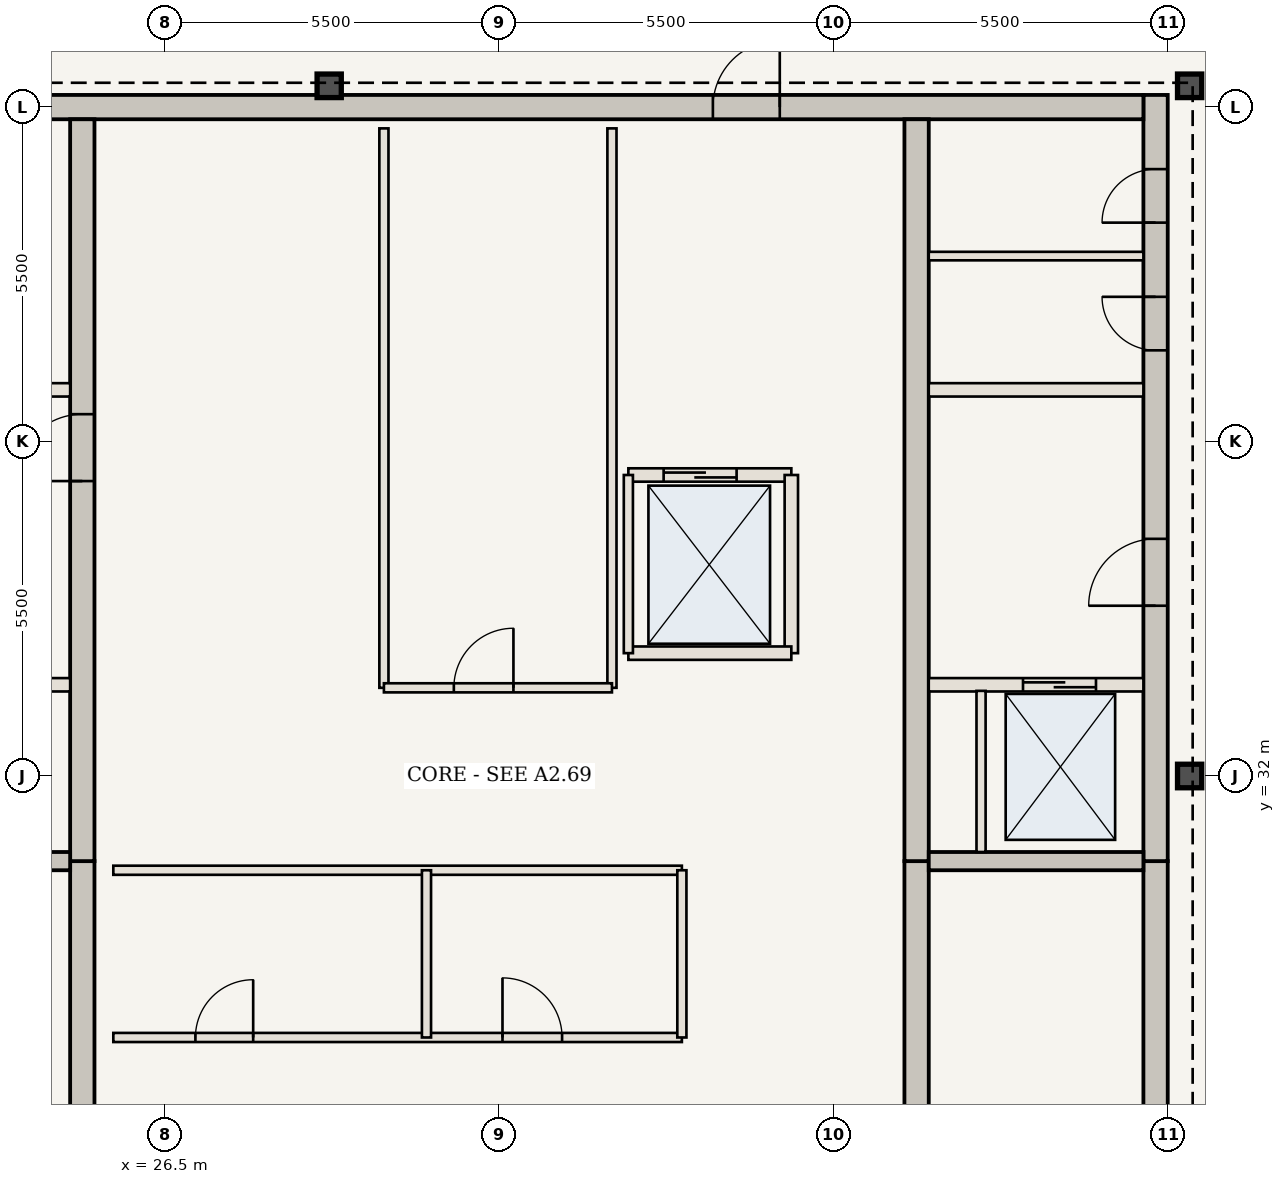
"""IFC4 building model, lengths in metres.
Left out: names, types, materials, properties, quantities, classifications, styles, units other than length and angle.
Written with IfcOpenShell. Run it as: python <this file> out.ifc"""

import sys

from ifc_helpers import new_model, si_unit, direction, frame, frame_2d, origin, origin_2d, place, context, subcontext, project, spatial, rectangle, i_section, extrude, element, fill, save


model = new_model("IFC4")
c1 = context("Model", 3, precision=1e-05, world=origin(), true_north=direction((0.0, 1.0)))
c2 = subcontext(c1, "Body", "Model", "MODEL_VIEW")
j1 = project(units=[si_unit("LENGTHUNIT", "METRE"), si_unit("PLANEANGLEUNIT", "RADIAN")], contexts=[c1])
p1 = place(None, origin())
s1 = spatial("IfcSite", under=j1, at=p1, CompositionType="ELEMENT")
p2 = place(p1, origin())
s2 = spatial("IfcBuilding", under=s1, at=p2, CompositionType="ELEMENT")
p3 = place(p2, frame((0.0, 0.0, 331.45)))
s3 = spatial("IfcBuildingStorey", under=s2, at=p3, CompositionType="ELEMENT", Elevation=331.45)
p4 = place(p3, frame((42.79, 20.75, 0.0), z_axis=(0.0, 0.0, 1.0), x_axis=(0.0, 1.0, 0.0)))
e1 = element("IfcWall", 1, at=p4, inside=s3, PredefinedType="SHEAR", context=c2, shape_type="SweptSolid", body=[
    extrude(rectangle(XDim=9.85, YDim=0.4, at=frame_2d((4.925, 0.0))), origin(), (0.0, 0.0, 1.0), 5.6),
])
p5 = place(p4, frame((1.0, 0.0, 0.0)))
e2 = element("IfcOpeningElement", 2, at=p5, cuts=e1, PredefinedType="OPENING", context=c2, shape_type="SweptSolid", body=[
    extrude(rectangle(XDim=1.15, YDim=2.15, at=frame_2d((0.575, 1.075))), frame((0.0, 0.21, 0.0), z_axis=(0.0, -1.0, 0.0), x_axis=(1.0, 0.0, 0.0)), (0.0, 0.0, 1.0), 0.42),
])
p6 = place(p3, frame((42.79, 30.6, 0.0), z_axis=(0.0, 0.0, 1.0), x_axis=(0.0, 1.0, 0.0)))
e3 = element("IfcWall", 3, at=p6, inside=s3, PredefinedType="SHEAR", context=c2, shape_type="SweptSolid", body=[
    extrude(rectangle(XDim=12.6, YDim=0.4, at=frame_2d((6.3, 0.0))), origin(), (0.0, 0.0, 1.0), 5.6),
])
p7 = place(p6, frame((4.2, 0.0, 0.0)))
e4 = element("IfcOpeningElement", 4, at=p7, cuts=e3, PredefinedType="OPENING", context=c2, shape_type="SweptSolid", body=[
    extrude(rectangle(XDim=1.1, YDim=2.15, at=frame_2d((0.55, 1.075))), frame((0.0, 0.21, 0.0), z_axis=(0.0, -1.0, 0.0), x_axis=(1.0, 0.0, 0.0)), (0.0, 0.0, 1.0), 0.42),
])
p8 = place(p6, frame((8.4, 0.0, 0.0)))
e5 = element("IfcOpeningElement", 5, at=p8, cuts=e3, PredefinedType="OPENING", context=c2, shape_type="SweptSolid", body=[
    extrude(rectangle(XDim=0.88, YDim=2.1, at=frame_2d((0.44, 1.05))), frame((0.0, 0.21, 0.0), z_axis=(0.0, -1.0, 0.0), x_axis=(1.0, 0.0, 0.0)), (0.0, 0.0, 1.0), 0.42),
])
p9 = place(p6, frame((10.5, 0.0, 0.0)))
e6 = element("IfcOpeningElement", 6, at=p9, cuts=e3, PredefinedType="OPENING", context=c2, shape_type="SweptSolid", body=[
    extrude(rectangle(XDim=0.88, YDim=2.1, at=frame_2d((0.44, 1.05))), frame((0.0, 0.21, 0.0), z_axis=(0.0, -1.0, 0.0), x_axis=(1.0, 0.0, 0.0)), (0.0, 0.0, 1.0), 0.42),
])
p10 = place(p3, frame((21.41, 43.0, 0.0), z_axis=(0.0, 0.0, 1.0), x_axis=(1.0, 0.0, 0.0)))
e7 = element("IfcWall", 7, at=p10, inside=s3, PredefinedType="SHEAR", context=c2, shape_type="SweptSolid", body=[
    extrude(rectangle(XDim=21.18, YDim=0.4, at=frame_2d((10.59, 0.0))), origin(), (0.0, 0.0, 1.0), 5.6),
])
p11 = place(p10, frame((14.1, 0.0, 0.0)))
e8 = element("IfcOpeningElement", 8, at=p11, cuts=e7, PredefinedType="OPENING", context=c2, shape_type="SweptSolid", body=[
    extrude(rectangle(XDim=1.1, YDim=2.15, at=frame_2d((0.55, 1.075))), frame((0.0, 0.21, 0.0), z_axis=(0.0, -1.0, 0.0), x_axis=(1.0, 0.0, 0.0)), (0.0, 0.0, 1.0), 0.42),
])
p12 = place(p3, frame((25.14, 21.15, 0.0), z_axis=(0.0, 0.0, 1.0), x_axis=(0.0, 1.0, 0.0)))
e9 = element("IfcWall", 9, at=p12, inside=s3, PredefinedType="SHEAR", context=c2, shape_type="SweptSolid", body=[
    extrude(rectangle(XDim=9.45, YDim=0.4, at=frame_2d((4.725, 0.0))), origin(), (0.0, 0.0, 1.0), 5.6),
])
p13 = place(p3, frame((25.14, 30.6, 0.0), z_axis=(0.0, 0.0, 1.0), x_axis=(0.0, 1.0, 0.0)))
e10 = element("IfcWall", 10, at=p13, inside=s3, PredefinedType="SHEAR", context=c2, shape_type="SweptSolid", body=[
    extrude(rectangle(XDim=12.2, YDim=0.4, at=frame_2d((6.1, 0.0))), origin(), (0.0, 0.0, 1.0), 5.6),
])
p14 = place(p13, frame((6.25, 0.0, 0.0)))
e11 = element("IfcOpeningElement", 11, at=p14, cuts=e10, PredefinedType="OPENING", context=c2, shape_type="SweptSolid", body=[
    extrude(rectangle(XDim=1.1, YDim=2.15, at=frame_2d((0.55, 1.075))), frame((0.0, 0.21, 0.0), z_axis=(0.0, -1.0, 0.0), x_axis=(1.0, 0.0, 0.0)), (0.0, 0.0, 1.0), 0.42),
])
p15 = place(p3, frame((38.86, 21.15, 0.0), z_axis=(0.0, 0.0, 1.0), x_axis=(0.0, 1.0, 0.0)))
e12 = element("IfcWall", 12, at=p15, inside=s3, PredefinedType="SHEAR", context=c2, shape_type="SweptSolid", body=[
    extrude(rectangle(XDim=9.45, YDim=0.4, at=frame_2d((4.725, 0.0))), origin(), (0.0, 0.0, 1.0), 5.6),
])
p16 = place(p3, frame((38.86, 30.6, 0.0), z_axis=(0.0, 0.0, 1.0), x_axis=(0.0, 1.0, 0.0)))
e13 = element("IfcWall", 13, at=p16, inside=s3, PredefinedType="SHEAR", context=c2, shape_type="SweptSolid", body=[
    extrude(rectangle(XDim=12.2, YDim=0.4, at=frame_2d((6.1, 0.0))), origin(), (0.0, 0.0, 1.0), 5.6),
])
p17 = place(p3, frame((43.35, 32.0, 0.0), z_axis=(0.0, 0.0, 1.0), x_axis=(1.0, 0.0, 0.0)))
e14 = element("IfcColumn", 14, at=p17, inside=s3, PredefinedType="COLUMN", context=c2, shape_type="SweptSolid", body=[
    extrude(i_section(OverallWidth=0.398, OverallDepth=0.387, WebThickness=0.021, FlangeThickness=0.033, at=origin_2d()), origin(), (0.0, 0.0, 1.0), 13.29),
])
for number, where, z_axis, x_axis in (
    (15, (43.35, 43.35, 0.0), (0.0, 0.0, 1.0), (1.0, 0.0, 0.0)),
    (16, (29.2, 43.35, 0.0), (0.0, 0.0, 1.0), (1.0, 0.0, 0.0)),
):
    element("IfcColumn", number, at=place(p3, frame(where, z_axis=z_axis, x_axis=x_axis)), inside=s3, PredefinedType="COLUMN", context=c2, shape_type="SweptSolid", body=[
        extrude(i_section(OverallWidth=0.398, OverallDepth=0.387, WebThickness=0.021, FlangeThickness=0.033, at=origin_2d()), origin(), (0.0, 0.0, 1.0), 18.839),
    ])
for number, where, z_axis, x_axis in (
    (17, (21.41, 30.6, 0.0), (0.0, 0.0, 1.0), (1.0, 0.0, 0.0)),
    (18, (39.06, 30.6, 0.0), (0.0, 0.0, 1.0), (1.0, 0.0, 0.0)),
):
    element("IfcWall", number, at=place(p3, frame(where, z_axis=z_axis, x_axis=x_axis)), inside=s3, PredefinedType="SHEAR", context=c2, shape_type="SweptSolid", body=[
        extrude(rectangle(XDim=3.53, YDim=0.3, at=frame_2d((1.765, 0.0))), origin(), (0.0, 0.0, 1.0), 5.35),
    ])
p18 = place(p3, frame((21.41, 33.5, 0.0), z_axis=(0.0, 0.0, 1.0), x_axis=(1.0, 0.0, 0.0)))
e19 = element("IfcWall", 19, at=p18, inside=s3, PredefinedType="STANDARD", context=c2, shape_type="SweptSolid", body=[
    extrude(rectangle(XDim=3.53, YDim=0.22, at=frame_2d((1.765, 0.0))), origin(), (0.0, 0.0, 1.0), 5.35),
])
p19 = place(p18, frame((0.75, 0.0, 0.0)))
e20 = element("IfcOpeningElement", 20, at=p19, cuts=e19, PredefinedType="OPENING", context=c2, shape_type="SweptSolid", body=[
    extrude(rectangle(XDim=1.2, YDim=2.2, at=frame_2d((0.6, 1.1))), frame((0.0, 0.12, 0.0), z_axis=(0.0, -1.0, 0.0), x_axis=(1.0, 0.0, 0.0)), (0.0, 0.0, 1.0), 0.24),
])
p20 = place(p3, frame((39.06, 33.5, 0.0), z_axis=(0.0, 0.0, 1.0), x_axis=(1.0, 0.0, 0.0)))
e21 = element("IfcWall", 21, at=p20, inside=s3, PredefinedType="STANDARD", context=c2, shape_type="SweptSolid", body=[
    extrude(rectangle(XDim=3.53, YDim=0.22, at=frame_2d((1.765, 0.0))), origin(), (0.0, 0.0, 1.0), 5.35),
])
p21 = place(p20, frame((1.55, 0.0, 0.0)))
e22 = element("IfcOpeningElement", 22, at=p21, cuts=e21, PredefinedType="OPENING", context=c2, shape_type="SweptSolid", body=[
    extrude(rectangle(XDim=1.2, YDim=2.2, at=frame_2d((0.6, 1.1))), frame((0.0, 0.12, 0.0), z_axis=(0.0, -1.0, 0.0), x_axis=(1.0, 0.0, 0.0)), (0.0, 0.0, 1.0), 0.24),
])
p22 = place(p3, frame((39.92, 30.75, 0.0), z_axis=(0.0, 0.0, 1.0), x_axis=(0.0, 1.0, 0.0)))
e23 = element("IfcWall", 23, at=p22, inside=s3, PredefinedType="STANDARD", context=c2, shape_type="SweptSolid", body=[
    extrude(rectangle(XDim=2.65, YDim=0.15, at=frame_2d((1.325, 0.0))), origin(), (0.0, 0.0, 1.0), 5.35),
])
for number, where, z_axis, x_axis in (
    (24, (21.41, 38.35, 0.0), (0.0, 0.0, 1.0), (1.0, 0.0, 0.0)),
    (25, (39.06, 38.35, 0.0), (0.0, 0.0, 1.0), (1.0, 0.0, 0.0)),
):
    element("IfcWall", number, at=place(p3, frame(where, z_axis=z_axis, x_axis=x_axis)), inside=s3, PredefinedType="STANDARD", context=c2, shape_type="SweptSolid", body=[
        extrude(rectangle(XDim=3.53, YDim=0.22, at=frame_2d((1.765, 0.0))), origin(), (0.0, 0.0, 1.0), 5.35),
    ])
p23 = place(p3, frame((39.06, 40.55, 0.0), z_axis=(0.0, 0.0, 1.0), x_axis=(1.0, 0.0, 0.0)))
e26 = element("IfcWall", 26, at=p23, inside=s3, PredefinedType="STANDARD", context=c2, shape_type="SweptSolid", body=[
    extrude(rectangle(XDim=3.53, YDim=0.14, at=frame_2d((1.765, 0.0))), origin(), (0.0, 0.0, 1.0), 5.35),
])
p24 = place(p3, frame((25.65, 27.7, 0.0), z_axis=(0.0, 0.0, 1.0), x_axis=(1.0, 0.0, 0.0)))
e27 = element("IfcWall", 27, at=p24, inside=s3, PredefinedType="STANDARD", context=c2, shape_type="SweptSolid", body=[
    extrude(rectangle(XDim=9.35, YDim=0.15, at=frame_2d((4.675, 0.0))), origin(), (0.0, 0.0, 1.0), 5.35),
])
p25 = place(p24, frame((1.35, 0.0, 0.0)))
e28 = element("IfcOpeningElement", 28, at=p25, cuts=e27, PredefinedType="OPENING", context=c2, shape_type="SweptSolid", body=[
    extrude(rectangle(XDim=0.95, YDim=2.15, at=frame_2d((0.475, 1.075))), frame((0.0, 0.085, 0.0), z_axis=(0.0, -1.0, 0.0), x_axis=(1.0, 0.0, 0.0)), (0.0, 0.0, 1.0), 0.17),
])
p26 = place(p24, frame((6.4, 0.0, 0.0)))
e29 = element("IfcOpeningElement", 29, at=p26, cuts=e27, PredefinedType="OPENING", context=c2, shape_type="SweptSolid", body=[
    extrude(rectangle(XDim=0.98, YDim=2.2, at=frame_2d((0.49, 1.1))), frame((0.0, 0.085, 0.0), z_axis=(0.0, -1.0, 0.0), x_axis=(1.0, 0.0, 0.0)), (0.0, 0.0, 1.0), 0.17),
])
p27 = place(p3, frame((25.65, 30.45, 0.0), z_axis=(0.0, 0.0, 1.0), x_axis=(1.0, 0.0, 0.0)))
e30 = element("IfcWall", 30, at=p27, inside=s3, PredefinedType="STANDARD", context=c2, shape_type="SweptSolid", body=[
    extrude(rectangle(XDim=9.35, YDim=0.15, at=frame_2d((4.675, 0.0))), origin(), (0.0, 0.0, 1.0), 5.35),
])
for number, where, z_axis, x_axis in (
    (31, (30.8, 27.7, 0.0), (0.0, 0.0, 1.0), (0.0, 1.0, 0.0)),
    (32, (35.0, 27.7, 0.0), (0.0, 0.0, 1.0), (0.0, 1.0, 0.0)),
):
    element("IfcWall", number, at=place(p3, frame(where, z_axis=z_axis, x_axis=x_axis)), inside=s3, PredefinedType="STANDARD", context=c2, shape_type="SweptSolid", body=[
        extrude(rectangle(XDim=2.75, YDim=0.15, at=frame_2d((1.375, 0.0))), origin(), (0.0, 0.0, 1.0), 5.35),
    ])
for number, where, z_axis, x_axis in (
    (33, (30.1, 33.45, 0.0), (0.0, 0.0, 1.0), (0.0, 1.0, 0.0)),
    (34, (33.85, 33.45, 0.0), (0.0, 0.0, 1.0), (0.0, 1.0, 0.0)),
):
    element("IfcWall", number, at=place(p3, frame(where, z_axis=z_axis, x_axis=x_axis)), inside=s3, PredefinedType="STANDARD", context=c2, shape_type="SweptSolid", body=[
        extrude(rectangle(XDim=9.2, YDim=0.15, at=frame_2d((4.6, 0.0))), origin(), (0.0, 0.0, 1.0), 5.35),
    ])
p28 = place(p3, frame((30.1, 33.45, 0.0), z_axis=(0.0, 0.0, 1.0), x_axis=(1.0, 0.0, 0.0)))
e35 = element("IfcWall", 35, at=p28, inside=s3, PredefinedType="STANDARD", context=c2, shape_type="SweptSolid", body=[
    extrude(rectangle(XDim=3.75, YDim=0.15, at=frame_2d((1.875, 0.0))), origin(), (0.0, 0.0, 1.0), 5.35),
])
p29 = place(p28, frame((1.15, 0.0, 0.0)))
e36 = element("IfcOpeningElement", 36, at=p29, cuts=e35, PredefinedType="OPENING", context=c2, shape_type="SweptSolid", body=[
    extrude(rectangle(XDim=0.98, YDim=2.2, at=frame_2d((0.49, 1.1))), frame((0.0, 0.085, 0.0), z_axis=(0.0, -1.0, 0.0), x_axis=(1.0, 0.0, 0.0)), (0.0, 0.0, 1.0), 0.17),
])
p30 = place(p3, frame((34.12, 36.95, 0.0), z_axis=(0.0, 0.0, 1.0), x_axis=(1.0, 0.0, 0.0)))
e37 = element("IfcWall", 37, at=p30, inside=s3, PredefinedType="STANDARD", context=c2, shape_type="SweptSolid", body=[
    extrude(rectangle(XDim=2.68, YDim=0.22, at=frame_2d((1.34, 0.0))), origin(), (0.0, 0.0, 1.0), 5.35),
])
p31 = place(p30, frame((0.58, 0.0, 0.0)))
e38 = element("IfcOpeningElement", 38, at=p31, cuts=e37, PredefinedType="OPENING", context=c2, shape_type="SweptSolid", body=[
    extrude(rectangle(XDim=1.2, YDim=2.2, at=frame_2d((0.6, 1.1))), frame((0.0, 0.12, 0.0), z_axis=(0.0, -1.0, 0.0), x_axis=(1.0, 0.0, 0.0)), (0.0, 0.0, 1.0), 0.24),
])
p32 = place(p3, frame((36.8, 34.02, 0.0), z_axis=(0.0, 0.0, 1.0), x_axis=(0.0, 1.0, 0.0)))
e39 = element("IfcWall", 39, at=p32, inside=s3, PredefinedType="STANDARD", context=c2, shape_type="SweptSolid", body=[
    extrude(rectangle(XDim=2.93, YDim=0.22, at=frame_2d((1.465, 0.0))), origin(), (0.0, 0.0, 1.0), 5.35),
])
p33 = place(p3, frame((34.12, 34.02, 0.0), z_axis=(0.0, 0.0, 1.0), x_axis=(1.0, 0.0, 0.0)))
e40 = element("IfcWall", 40, at=p33, inside=s3, PredefinedType="STANDARD", context=c2, shape_type="SweptSolid", body=[
    extrude(rectangle(XDim=2.68, YDim=0.22, at=frame_2d((1.34, 0.0))), origin(), (0.0, 0.0, 1.0), 5.35),
])
p34 = place(p3, frame((34.12, 34.02, 0.0), z_axis=(0.0, 0.0, 1.0), x_axis=(0.0, 1.0, 0.0)))
e41 = element("IfcWall", 41, at=p34, inside=s3, PredefinedType="STANDARD", context=c2, shape_type="SweptSolid", body=[
    extrude(rectangle(XDim=2.93, YDim=0.15, at=frame_2d((1.465, 0.0))), origin(), (0.0, 0.0, 1.0), 5.35),
])
p35 = place(p7, origin())
e42 = element("IfcDoor", 42, at=p35, inside=s3, OperationType="SINGLE_SWING_LEFT", PredefinedType="DOOR", context=c2, shape_type="SweptSolid", body=[
    extrude(rectangle(XDim=1.1, YDim=2.15, at=frame_2d((0.55, 1.075))), frame((0.0, 0.025, 0.0), z_axis=(0.0, -1.0, 0.0), x_axis=(1.0, 0.0, 0.0)), (0.0, 0.0, 1.0), 0.05),
])
fill(e4, e42)
p36 = place(p14, origin())
e43 = element("IfcDoor", 43, at=p36, inside=s3, OperationType="SINGLE_SWING_LEFT", PredefinedType="DOOR", context=c2, shape_type="SweptSolid", body=[
    extrude(rectangle(XDim=1.1, YDim=2.15, at=frame_2d((0.55, 1.075))), frame((0.0, 0.025, 0.0), z_axis=(0.0, -1.0, 0.0), x_axis=(1.0, 0.0, 0.0)), (0.0, 0.0, 1.0), 0.05),
])
fill(e11, e43)
p37 = place(p8, origin())
e44 = element("IfcDoor", 44, at=p37, inside=s3, OperationType="SINGLE_SWING_RIGHT", PredefinedType="DOOR", context=c2, shape_type="SweptSolid", body=[
    extrude(rectangle(XDim=0.88, YDim=2.1, at=frame_2d((0.44, 1.05))), frame((0.0, 0.025, 0.0), z_axis=(0.0, -1.0, 0.0), x_axis=(1.0, 0.0, 0.0)), (0.0, 0.0, 1.0), 0.05),
])
fill(e5, e44)
p38 = place(p9, origin())
e45 = element("IfcDoor", 45, at=p38, inside=s3, OperationType="SINGLE_SWING_LEFT", PredefinedType="DOOR", context=c2, shape_type="SweptSolid", body=[
    extrude(rectangle(XDim=0.88, YDim=2.1, at=frame_2d((0.44, 1.05))), frame((0.0, 0.025, 0.0), z_axis=(0.0, -1.0, 0.0), x_axis=(1.0, 0.0, 0.0)), (0.0, 0.0, 1.0), 0.05),
])
fill(e6, e45)
p39 = place(p11, origin())
e46 = element("IfcDoor", 46, at=p39, inside=s3, OperationType="SINGLE_SWING_RIGHT", PredefinedType="DOOR", context=c2, shape_type="SweptSolid", body=[
    extrude(rectangle(XDim=1.1, YDim=2.15, at=frame_2d((0.55, 1.075))), frame((0.0, 0.025, 0.0), z_axis=(0.0, -1.0, 0.0), x_axis=(1.0, 0.0, 0.0)), (0.0, 0.0, 1.0), 0.05),
])
fill(e8, e46)
p40 = place(p21, origin())
e47 = element("IfcDoor", 47, at=p40, inside=s3, OperationType="DOUBLE_DOOR_SLIDING", PredefinedType="DOOR", context=c2, shape_type="SweptSolid", body=[
    extrude(rectangle(XDim=1.2, YDim=2.2, at=frame_2d((0.6, 1.1))), frame((0.0, 0.025, 0.0), z_axis=(0.0, -1.0, 0.0), x_axis=(1.0, 0.0, 0.0)), (0.0, 0.0, 1.0), 0.05),
])
fill(e22, e47)
p41 = place(p25, origin())
e48 = element("IfcDoor", 48, at=p41, inside=s3, OperationType="SINGLE_SWING_RIGHT", PredefinedType="DOOR", context=c2, shape_type="SweptSolid", body=[
    extrude(rectangle(XDim=0.95, YDim=2.15, at=frame_2d((0.475, 1.075))), frame((0.0, 0.025, 0.0), z_axis=(0.0, -1.0, 0.0), x_axis=(1.0, 0.0, 0.0)), (0.0, 0.0, 1.0), 0.05),
])
fill(e28, e48)
p42 = place(p26, origin())
e49 = element("IfcDoor", 49, at=p42, inside=s3, OperationType="SINGLE_SWING_LEFT", PredefinedType="DOOR", context=c2, shape_type="SweptSolid", body=[
    extrude(rectangle(XDim=0.98, YDim=2.2, at=frame_2d((0.49, 1.1))), frame((0.0, 0.025, 0.0), z_axis=(0.0, -1.0, 0.0), x_axis=(1.0, 0.0, 0.0)), (0.0, 0.0, 1.0), 0.05),
])
fill(e29, e49)
p43 = place(p29, origin())
e50 = element("IfcDoor", 50, at=p43, inside=s3, OperationType="SINGLE_SWING_RIGHT", PredefinedType="DOOR", context=c2, shape_type="SweptSolid", body=[
    extrude(rectangle(XDim=0.98, YDim=2.2, at=frame_2d((0.49, 1.1))), frame((0.0, 0.025, 0.0), z_axis=(0.0, -1.0, 0.0), x_axis=(1.0, 0.0, 0.0)), (0.0, 0.0, 1.0), 0.05),
])
fill(e36, e50)
p44 = place(p31, origin())
e51 = element("IfcDoor", 51, at=p44, inside=s3, OperationType="DOUBLE_DOOR_SLIDING", PredefinedType="DOOR", context=c2, shape_type="SweptSolid", body=[
    extrude(rectangle(XDim=1.2, YDim=2.2, at=frame_2d((0.6, 1.1))), frame((0.0, 0.025, 0.0), z_axis=(0.0, -1.0, 0.0), x_axis=(1.0, 0.0, 0.0)), (0.0, 0.0, 1.0), 0.05),
])
fill(e38, e51)
save(model, sys.argv[1])
